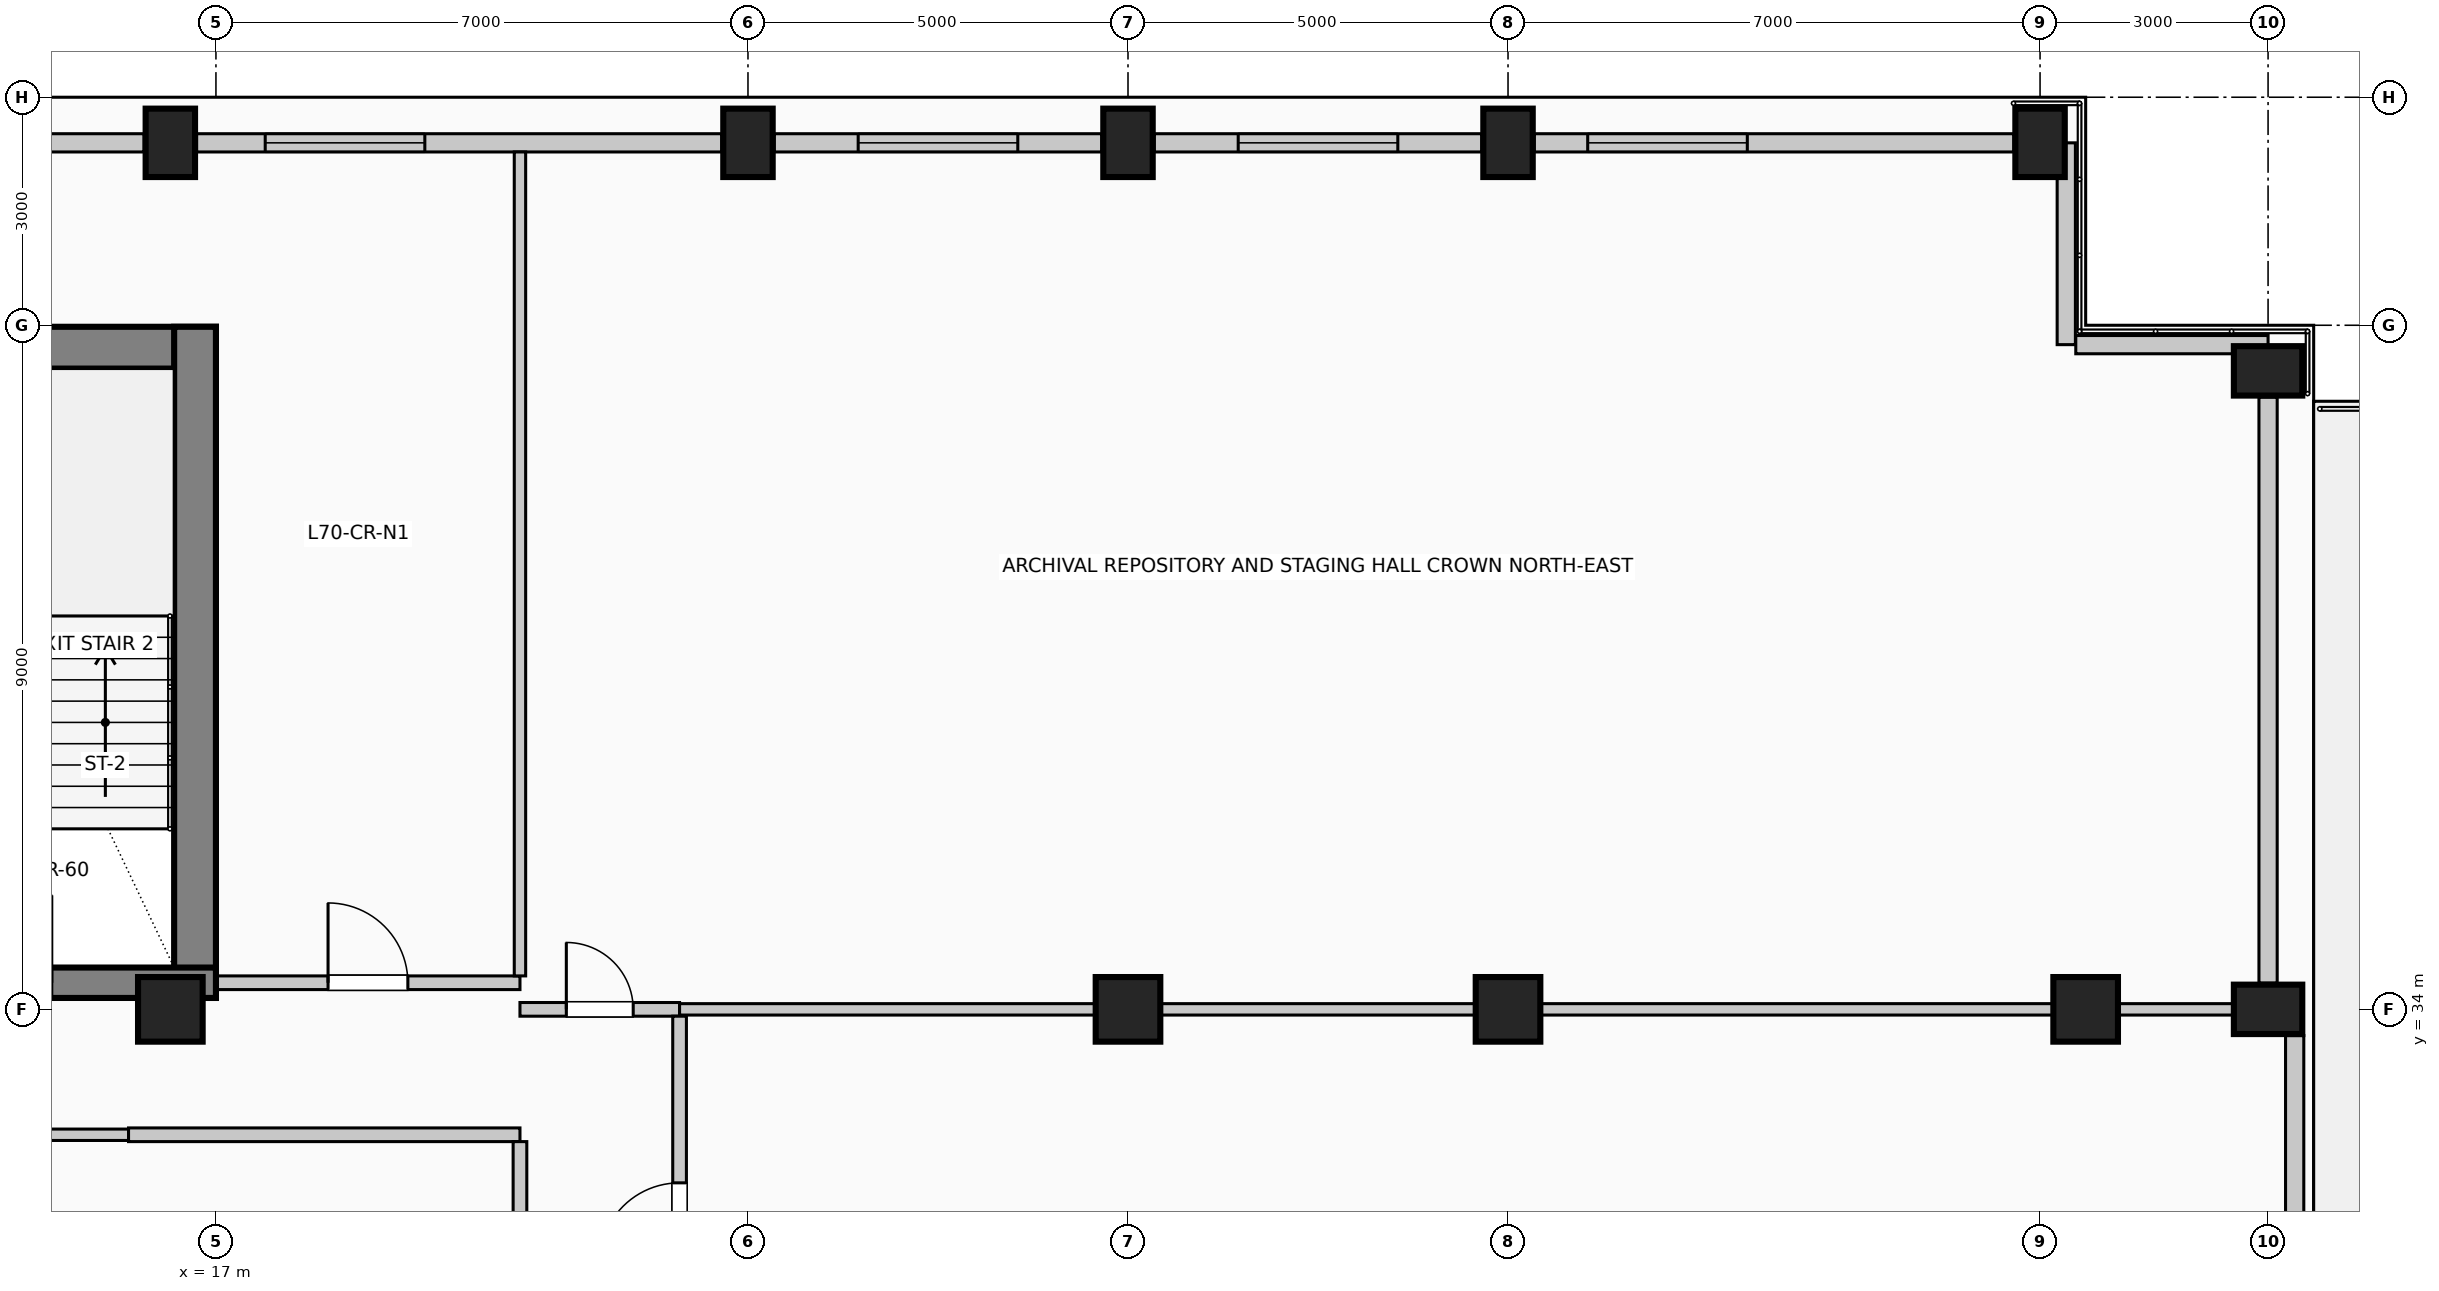
"""IFC4 building model, lengths in metres.
Left out: names, types, materials, properties, quantities, classifications, styles, units other than length and angle.
Written with IfcOpenShell. Run it as: python <this file> out.ifc"""

import sys

from ifc_helpers import new_model, si_unit, direction, frame, frame_2d, origin, origin_2d, place, context, subcontext, project, spatial, rectangle, circle, extrude, element, fill, save


model = new_model("IFC4")
c1 = context("Model", 3, precision=1e-05, world=origin(), true_north=direction((0.0, 1.0)))
c2 = subcontext(c1, "Body", "Model", "MODEL_VIEW")
j1 = project(units=[si_unit("LENGTHUNIT", "METRE"), si_unit("PLANEANGLEUNIT", "RADIAN")], contexts=[c1])
p1 = place(None, origin())
s1 = spatial("IfcSite", under=j1, at=p1, CompositionType="ELEMENT")
p2 = place(p1, origin())
s2 = spatial("IfcBuilding", under=s1, at=p2, CompositionType="ELEMENT")
p3 = place(p2, frame((0.0, 0.0, 289.0)))
s3 = spatial("IfcBuildingStorey", under=s2, at=p3, CompositionType="ELEMENT", Elevation=289.0)
p4 = place(p3, frame((3.0, 42.705, 0.0), z_axis=(0.0, 0.0, 1.0), x_axis=(1.0, 0.0, 0.0)))
e1 = element("IfcWall", 1, at=p4, inside=s3, PredefinedType="SHEAR", context=c2, shape_type="SweptSolid", body=[
    extrude(rectangle(XDim=14.0, YDim=0.55, at=frame_2d((7.0, 0.0))), origin(), (0.0, 0.0, 1.0), 4.0),
])
p5 = place(p3, frame((16.725, 34.15, 0.0), z_axis=(0.0, 0.0, 1.0), x_axis=(0.0, 1.0, 0.0)))
e2 = element("IfcWall", 2, at=p5, inside=s3, PredefinedType="SHEAR", context=c2, shape_type="SweptSolid", body=[
    extrude(rectangle(XDim=8.83, YDim=0.55, at=frame_2d((4.415, 0.0))), origin(), (0.0, 0.0, 1.0), 4.0),
])
p6 = place(p3, frame((12.29, 34.35, 0.0), z_axis=(0.0, 0.0, 1.0), x_axis=(1.0, 0.0, 0.0)))
e3 = element("IfcWall", 3, at=p6, inside=s3, PredefinedType="SHEAR", context=c2, shape_type="SweptSolid", body=[
    extrude(rectangle(XDim=4.71, YDim=0.4, at=frame_2d((2.355, 0.0))), origin(), (0.0, 0.0, 1.0), 4.0),
])
p7 = place(p6, frame((1.4, 0.0, 0.0)))
e4 = element("IfcOpeningElement", 4, at=p7, cuts=e3, PredefinedType="OPENING", context=c2, shape_type="SweptSolid", body=[
    extrude(rectangle(XDim=1.15, YDim=2.2, at=frame_2d((0.575, 1.1))), frame((0.0, 0.21, 0.0), z_axis=(0.0, -1.0, 0.0), x_axis=(1.0, 0.0, 0.0)), (0.0, 0.0, 1.0), 0.42),
])
for number, where, z_axis, x_axis in (
    (5, (16.4, 45.4, 0.0), (0.0, 0.0, 1.0), (1.0, 0.0, 0.0)),
    (6, (24.0, 45.4, 0.0), (0.0, 0.0, 1.0), (1.0, 0.0, 0.0)),
    (7, (29.0, 45.4, 0.0), (0.0, 0.0, 1.0), (1.0, 0.0, 0.0)),
    (8, (34.0, 45.4, 0.0), (0.0, 0.0, 1.0), (1.0, 0.0, 0.0)),
    (9, (41.0, 45.4, 0.0), (0.0, 0.0, 1.0), (1.0, 0.0, 0.0)),
    (10, (44.0, 34.0, 0.0), (0.0, 0.0, 1.0), (0.0, 1.0, 0.0)),
    (11, (44.0, 42.4, 0.0), (0.0, 0.0, 1.0), (0.0, 1.0, 0.0)),
):
    element("IfcColumn", number, at=place(p3, frame(where, z_axis=z_axis, x_axis=x_axis)), inside=s3, PredefinedType="COLUMN", context=c2, shape_type="SweptSolid", body=[
        extrude(rectangle(XDim=0.65, YDim=0.9, at=origin_2d()), origin(), (0.0, 0.0, 1.0), 4.0),
    ])
for number, where, z_axis, x_axis in (
    (12, (16.4, 34.0, 0.0), (0.0, 0.0, 1.0), (1.0, 0.0, 0.0)),
    (13, (29.0, 34.0, 0.0), (0.0, 0.0, 1.0), (1.0, 0.0, 0.0)),
    (14, (41.6, 34.0, 0.0), (0.0, 0.0, 1.0), (1.0, 0.0, 0.0)),
    (15, (34.0, 34.0, 0.0), (0.0, 0.0, 1.0), (1.0, 0.0, 0.0)),
):
    element("IfcColumn", number, at=place(p3, frame(where, z_axis=z_axis, x_axis=x_axis)), inside=s3, PredefinedType="COLUMN", context=c2, shape_type="SweptSolid", body=[
        extrude(circle(Radius=0.425, at=origin_2d()), origin(), (0.0, 0.0, 1.0), 4.0),
    ])
p8 = place(p3, frame((14.345, 45.4, 0.0), z_axis=(0.0, 0.0, 1.0), x_axis=(1.0, 0.0, 0.0)))
e16 = element("IfcWall", 16, at=p8, inside=s3, PredefinedType="SOLIDWALL", context=c2, shape_type="SweptSolid", body=[
    extrude(rectangle(XDim=1.71, YDim=0.24, at=frame_2d((0.855, 0.0))), origin(), (0.0, 0.0, 1.0), 3.025),
])
p9 = place(p3, frame((16.745, 45.4, 0.0), z_axis=(0.0, 0.0, 1.0), x_axis=(1.0, 0.0, 0.0)))
e17 = element("IfcWall", 17, at=p9, inside=s3, PredefinedType="SOLIDWALL", context=c2, shape_type="SweptSolid", body=[
    extrude(rectangle(XDim=6.91, YDim=0.24, at=frame_2d((3.455, 0.0))), origin(), (0.0, 0.0, 1.0), 3.025),
])
p10 = place(p9, frame((0.903, 0.0, 0.35)))
e18 = element("IfcOpeningElement", 18, at=p10, cuts=e17, PredefinedType="OPENING", context=c2, shape_type="SweptSolid", body=[
    extrude(rectangle(XDim=2.1, YDim=2.2, at=frame_2d((1.05, 1.1))), frame((0.0, 0.13, 0.0), z_axis=(0.0, -1.0, 0.0), x_axis=(1.0, 0.0, 0.0)), (0.0, 0.0, 1.0), 0.26),
])
p11 = place(p3, frame((24.345, 45.4, 0.0), z_axis=(0.0, 0.0, 1.0), x_axis=(1.0, 0.0, 0.0)))
e19 = element("IfcWall", 19, at=p11, inside=s3, PredefinedType="SOLIDWALL", context=c2, shape_type="SweptSolid", body=[
    extrude(rectangle(XDim=4.31, YDim=0.24, at=frame_2d((2.155, 0.0))), origin(), (0.0, 0.0, 1.0), 3.025),
])
p12 = place(p11, frame((1.105, 0.0, 0.35)))
e20 = element("IfcOpeningElement", 20, at=p12, cuts=e19, PredefinedType="OPENING", context=c2, shape_type="SweptSolid", body=[
    extrude(rectangle(XDim=2.1, YDim=2.2, at=frame_2d((1.05, 1.1))), frame((0.0, 0.13, 0.0), z_axis=(0.0, -1.0, 0.0), x_axis=(1.0, 0.0, 0.0)), (0.0, 0.0, 1.0), 0.26),
])
p13 = place(p3, frame((29.345, 45.4, 0.0), z_axis=(0.0, 0.0, 1.0), x_axis=(1.0, 0.0, 0.0)))
e21 = element("IfcWall", 21, at=p13, inside=s3, PredefinedType="SOLIDWALL", context=c2, shape_type="SweptSolid", body=[
    extrude(rectangle(XDim=4.31, YDim=0.24, at=frame_2d((2.155, 0.0))), origin(), (0.0, 0.0, 1.0), 3.025),
])
p14 = place(p13, frame((1.105, 0.0, 0.35)))
e22 = element("IfcOpeningElement", 22, at=p14, cuts=e21, PredefinedType="OPENING", context=c2, shape_type="SweptSolid", body=[
    extrude(rectangle(XDim=2.1, YDim=2.2, at=frame_2d((1.05, 1.1))), frame((0.0, 0.13, 0.0), z_axis=(0.0, -1.0, 0.0), x_axis=(1.0, 0.0, 0.0)), (0.0, 0.0, 1.0), 0.26),
])
p15 = place(p3, frame((34.345, 45.4, 0.0), z_axis=(0.0, 0.0, 1.0), x_axis=(1.0, 0.0, 0.0)))
e23 = element("IfcWall", 23, at=p15, inside=s3, PredefinedType="SOLIDWALL", context=c2, shape_type="SweptSolid", body=[
    extrude(rectangle(XDim=6.31, YDim=0.24, at=frame_2d((3.155, 0.0))), origin(), (0.0, 0.0, 1.0), 3.025),
])
p16 = place(p15, frame((0.703, 0.0, 0.35)))
e24 = element("IfcOpeningElement", 24, at=p16, cuts=e23, PredefinedType="OPENING", context=c2, shape_type="SweptSolid", body=[
    extrude(rectangle(XDim=2.1, YDim=2.2, at=frame_2d((1.05, 1.1))), frame((0.0, 0.13, 0.0), z_axis=(0.0, -1.0, 0.0), x_axis=(1.0, 0.0, 0.0)), (0.0, 0.0, 1.0), 0.26),
])
p17 = place(p3, frame((44.35, 33.655, 0.0), z_axis=(0.0, 0.0, 1.0), x_axis=(0.0, -1.0, 0.0)))
e25 = element("IfcWall", 25, at=p17, inside=s3, PredefinedType="SOLIDWALL", context=c2, shape_type="SweptSolid", body=[
    extrude(rectangle(XDim=15.31, YDim=0.24, at=frame_2d((7.655, 0.0))), origin(), (0.0, 0.0, 1.0), 3.775),
])
p18 = place(p17, frame((9.455, 0.0, 0.0)))
e26 = element("IfcOpeningElement", 26, at=p18, cuts=e25, PredefinedType="OPENING", context=c2, shape_type="SweptSolid", body=[
    extrude(rectangle(XDim=1.2, YDim=2.25, at=frame_2d((0.6, 1.125))), frame((0.0, 0.13, 0.0), z_axis=(0.0, -1.0, 0.0), x_axis=(1.0, 0.0, 0.0)), (0.0, 0.0, 1.0), 0.26),
])
p19 = place(p3, frame((44.0, 42.055, 0.0), z_axis=(0.0, 0.0, 1.0), x_axis=(0.0, -1.0, 0.0)))
e27 = element("IfcWall", 27, at=p19, inside=s3, PredefinedType="SOLIDWALL", context=c2, shape_type="SweptSolid", body=[
    extrude(rectangle(XDim=7.71, YDim=0.24, at=frame_2d((3.855, 0.0))), origin(), (0.0, 0.0, 1.0), 3.025),
])
p20 = place(p3, frame((41.345, 45.4, 0.0), z_axis=(0.0, 0.0, 1.0), x_axis=(0.0, -1.0, 0.0)))
e28 = element("IfcWall", 28, at=p20, inside=s3, PredefinedType="SOLIDWALL", context=c2, shape_type="SweptSolid", body=[
    extrude(rectangle(XDim=2.655, YDim=0.24, at=frame_2d((1.327, 0.0))), origin(), (0.0, 0.0, 1.0), 3.775),
])
p21 = place(p3, frame((41.47, 42.745, 0.0), z_axis=(0.0, 0.0, 1.0), x_axis=(1.0, 0.0, 0.0)))
e29 = element("IfcWall", 29, at=p21, inside=s3, PredefinedType="SOLIDWALL", context=c2, shape_type="SweptSolid", body=[
    extrude(rectangle(XDim=2.53, YDim=0.24, at=frame_2d((1.265, 0.0))), origin(), (0.0, 0.0, 1.0), 3.775),
])
p22 = place(p3, frame((12.33, 32.35, 0.0), z_axis=(0.0, 0.0, 1.0), x_axis=(1.0, 0.0, 0.0)))
e30 = element("IfcWall", 30, at=p22, inside=s3, PredefinedType="PARTITIONING", context=c2, shape_type="SweptSolid", body=[
    extrude(rectangle(XDim=3.52, YDim=0.15, at=frame_2d((1.76, 0.0))), origin(), (0.0, 0.0, 1.0), 3.775),
])
p23 = place(p22, frame((1.285, 0.0, 0.0)))
e31 = element("IfcOpeningElement", 31, at=p23, cuts=e30, PredefinedType="OPENING", context=c2, shape_type="SweptSolid", body=[
    extrude(rectangle(XDim=0.95, YDim=2.15, at=frame_2d((0.475, 1.075))), frame((0.0, 0.085, 0.0), z_axis=(0.0, -1.0, 0.0), x_axis=(1.0, 0.0, 0.0)), (0.0, 0.0, 1.0), 0.17),
])
p24 = place(p3, frame((15.85, 32.35, 0.0), z_axis=(0.0, 0.0, 1.0), x_axis=(1.0, 0.0, 0.0)))
e32 = element("IfcWall", 32, at=p24, inside=s3, PredefinedType="PARTITIONING", context=c2, shape_type="SweptSolid", body=[
    extrude(rectangle(XDim=5.15, YDim=0.18, at=frame_2d((2.575, 0.0))), origin(), (0.0, 0.0, 1.0), 3.775),
])
p25 = place(p3, frame((21.0, 34.0, 0.0), z_axis=(0.0, 0.0, 1.0), x_axis=(1.0, 0.0, 0.0)))
e33 = element("IfcWall", 33, at=p25, inside=s3, PredefinedType="PARTITIONING", context=c2, shape_type="SweptSolid", body=[
    extrude(rectangle(XDim=2.1, YDim=0.18, at=frame_2d((1.05, 0.0))), origin(), (0.0, 0.0, 1.0), 3.27),
])
p26 = place(p25, frame((0.61, 0.0, 0.0)))
e34 = element("IfcOpeningElement", 34, at=p26, cuts=e33, PredefinedType="OPENING", context=c2, shape_type="SweptSolid", body=[
    extrude(rectangle(XDim=0.88, YDim=2.1, at=frame_2d((0.44, 1.05))), frame((0.0, 0.1, 0.0), z_axis=(0.0, -1.0, 0.0), x_axis=(1.0, 0.0, 0.0)), (0.0, 0.0, 1.0), 0.2),
])
p27 = place(p3, frame((23.1, 34.0, 0.0), z_axis=(0.0, 0.0, 1.0), x_axis=(1.0, 0.0, 0.0)))
e35 = element("IfcWall", 35, at=p27, inside=s3, PredefinedType="PARTITIONING", context=c2, shape_type="SweptSolid", body=[
    extrude(rectangle(XDim=5.475, YDim=0.15, at=frame_2d((2.737, 0.0))), origin(), (0.0, 0.0, 1.0), 3.27),
])
p28 = place(p3, frame((29.425, 34.0, 0.0), z_axis=(0.0, 0.0, 1.0), x_axis=(1.0, 0.0, 0.0)))
e36 = element("IfcWall", 36, at=p28, inside=s3, PredefinedType="PARTITIONING", context=c2, shape_type="SweptSolid", body=[
    extrude(rectangle(XDim=4.15, YDim=0.15, at=frame_2d((2.075, 0.0))), origin(), (0.0, 0.0, 1.0), 3.27),
])
p29 = place(p3, frame((34.425, 34.0, 0.0), z_axis=(0.0, 0.0, 1.0), x_axis=(1.0, 0.0, 0.0)))
e37 = element("IfcWall", 37, at=p29, inside=s3, PredefinedType="PARTITIONING", context=c2, shape_type="SweptSolid", body=[
    extrude(rectangle(XDim=6.75, YDim=0.15, at=frame_2d((3.375, 0.0))), origin(), (0.0, 0.0, 1.0), 3.27),
])
p30 = place(p3, frame((42.025, 34.0, 0.0), z_axis=(0.0, 0.0, 1.0), x_axis=(1.0, 0.0, 0.0)))
e38 = element("IfcWall", 38, at=p30, inside=s3, PredefinedType="PARTITIONING", context=c2, shape_type="SweptSolid", body=[
    extrude(rectangle(XDim=1.525, YDim=0.15, at=frame_2d((0.763, 0.0))), origin(), (0.0, 0.0, 1.0), 3.27),
])
p31 = place(p3, frame((17.0, 34.35, 0.0), z_axis=(0.0, 0.0, 1.0), x_axis=(1.0, 0.0, 0.0)))
e39 = element("IfcWall", 39, at=p31, inside=s3, PredefinedType="PARTITIONING", context=c2, shape_type="SweptSolid", body=[
    extrude(rectangle(XDim=4.0, YDim=0.18, at=frame_2d((2.0, 0.0))), origin(), (0.0, 0.0, 1.0), 3.775),
])
p32 = place(p31, frame((1.475, 0.0, 0.0)))
e40 = element("IfcOpeningElement", 40, at=p32, cuts=e39, PredefinedType="OPENING", context=c2, shape_type="SweptSolid", body=[
    extrude(rectangle(XDim=1.05, YDim=2.15, at=frame_2d((0.525, 1.075))), frame((0.0, 0.1, 0.0), z_axis=(0.0, -1.0, 0.0), x_axis=(1.0, 0.0, 0.0)), (0.0, 0.0, 1.0), 0.2),
])
p33 = place(p3, frame((21.0, 26.925, 0.0), z_axis=(0.0, 0.0, 1.0), x_axis=(0.0, 1.0, 0.0)))
e41 = element("IfcWall", 41, at=p33, inside=s3, PredefinedType="PARTITIONING", context=c2, shape_type="SweptSolid", body=[
    extrude(rectangle(XDim=5.335, YDim=0.18, at=frame_2d((2.667, 0.0))), origin(), (0.0, 0.0, 1.0), 3.775),
])
p34 = place(p3, frame((21.0, 34.44, 0.0), z_axis=(0.0, 0.0, 1.0), x_axis=(0.0, 1.0, 0.0)))
e42 = element("IfcWall", 42, at=p34, inside=s3, PredefinedType="PARTITIONING", context=c2, shape_type="SweptSolid", body=[
    extrude(rectangle(XDim=10.84, YDim=0.15, at=frame_2d((5.42, 0.0))), origin(), (0.0, 0.0, 1.0), 3.775),
])
p35 = place(p3, frame((23.1, 28.475, 0.0), z_axis=(0.0, 0.0, 1.0), x_axis=(0.0, 1.0, 0.0)))
e43 = element("IfcWall", 43, at=p35, inside=s3, PredefinedType="PARTITIONING", context=c2, shape_type="SweptSolid", body=[
    extrude(rectangle(XDim=5.435, YDim=0.18, at=frame_2d((2.717, 0.0))), origin(), (0.0, 0.0, 1.0), 3.775),
])
p36 = place(p35, frame((2.192, 0.0, 0.0)))
e44 = element("IfcOpeningElement", 44, at=p36, cuts=e43, PredefinedType="OPENING", context=c2, shape_type="SweptSolid", body=[
    extrude(rectangle(XDim=1.05, YDim=2.15, at=frame_2d((0.525, 1.075))), frame((0.0, 0.1, 0.0), z_axis=(0.0, -1.0, 0.0), x_axis=(1.0, 0.0, 0.0)), (0.0, 0.0, 1.0), 0.2),
])
p37 = place(p10, origin())
e45 = element("IfcWindow", 45, at=p37, inside=s3, PartitioningType="SINGLE_PANEL", PredefinedType="WINDOW", context=c2, shape_type="SweptSolid", body=[
    extrude(rectangle(XDim=2.1, YDim=2.2, at=frame_2d((1.05, 1.1))), frame((0.0, 0.03, 0.0), z_axis=(0.0, -1.0, 0.0), x_axis=(1.0, 0.0, 0.0)), (0.0, 0.0, 1.0), 0.06),
])
fill(e18, e45)
p38 = place(p12, origin())
e46 = element("IfcWindow", 46, at=p38, inside=s3, PartitioningType="SINGLE_PANEL", PredefinedType="WINDOW", context=c2, shape_type="SweptSolid", body=[
    extrude(rectangle(XDim=2.1, YDim=2.2, at=frame_2d((1.05, 1.1))), frame((0.0, 0.03, 0.0), z_axis=(0.0, -1.0, 0.0), x_axis=(1.0, 0.0, 0.0)), (0.0, 0.0, 1.0), 0.06),
])
fill(e20, e46)
p39 = place(p14, origin())
e47 = element("IfcWindow", 47, at=p39, inside=s3, PartitioningType="SINGLE_PANEL", PredefinedType="WINDOW", context=c2, shape_type="SweptSolid", body=[
    extrude(rectangle(XDim=2.1, YDim=2.2, at=frame_2d((1.05, 1.1))), frame((0.0, 0.03, 0.0), z_axis=(0.0, -1.0, 0.0), x_axis=(1.0, 0.0, 0.0)), (0.0, 0.0, 1.0), 0.06),
])
fill(e22, e47)
p40 = place(p16, origin())
e48 = element("IfcWindow", 48, at=p40, inside=s3, PartitioningType="SINGLE_PANEL", PredefinedType="WINDOW", context=c2, shape_type="SweptSolid", body=[
    extrude(rectangle(XDim=2.1, YDim=2.2, at=frame_2d((1.05, 1.1))), frame((0.0, 0.03, 0.0), z_axis=(0.0, -1.0, 0.0), x_axis=(1.0, 0.0, 0.0)), (0.0, 0.0, 1.0), 0.06),
])
fill(e24, e48)
p41 = place(p26, origin())
e49 = element("IfcDoor", 49, at=p41, inside=s3, OperationType="SINGLE_SWING_LEFT", PredefinedType="DOOR", context=c2, shape_type="SweptSolid", body=[
    extrude(rectangle(XDim=0.88, YDim=2.1, at=frame_2d((0.44, 1.05))), frame((0.0, 0.025, 0.0), z_axis=(0.0, -1.0, 0.0), x_axis=(1.0, 0.0, 0.0)), (0.0, 0.0, 1.0), 0.05),
])
fill(e34, e49)
p42 = place(p32, origin())
e50 = element("IfcDoor", 50, at=p42, inside=s3, OperationType="SINGLE_SWING_LEFT", PredefinedType="DOOR", context=c2, shape_type="SweptSolid", body=[
    extrude(rectangle(XDim=1.05, YDim=2.15, at=frame_2d((0.525, 1.075))), frame((0.0, 0.025, 0.0), z_axis=(0.0, -1.0, 0.0), x_axis=(1.0, 0.0, 0.0)), (0.0, 0.0, 1.0), 0.05),
])
fill(e40, e50)
p43 = place(p36, origin())
e51 = element("IfcDoor", 51, at=p43, inside=s3, OperationType="SINGLE_SWING_LEFT", PredefinedType="DOOR", context=c2, shape_type="SweptSolid", body=[
    extrude(rectangle(XDim=1.05, YDim=2.15, at=frame_2d((0.525, 1.075))), frame((0.0, 0.025, 0.0), z_axis=(0.0, -1.0, 0.0), x_axis=(1.0, 0.0, 0.0)), (0.0, 0.0, 1.0), 0.05),
])
fill(e44, e51)
save(model, sys.argv[1])
